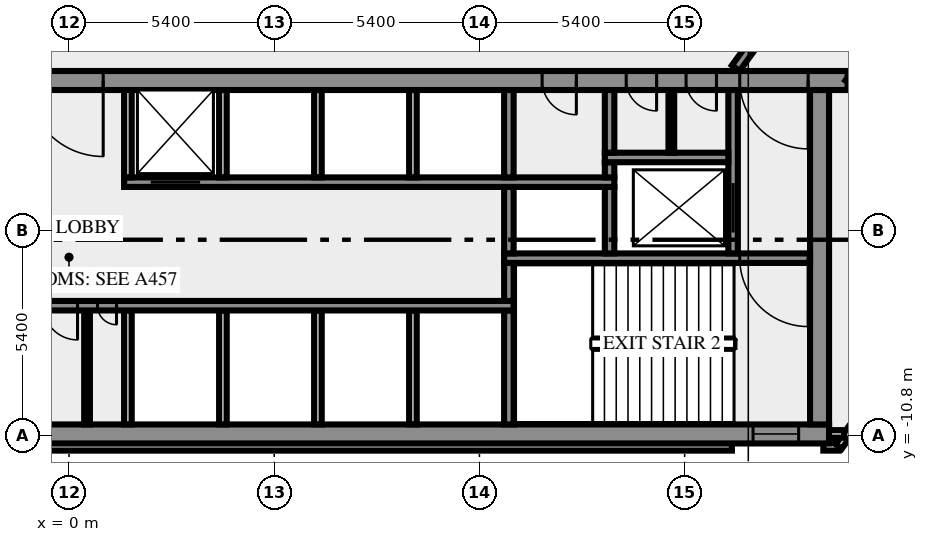
"""IFC4 building model, lengths in metres.
Left out: names, types, materials, properties, quantities, classifications, styles, units other than length and angle.
Written with IfcOpenShell. Run it as: python <this file> out.ifc"""

import sys

from ifc_helpers import new_model, si_unit, direction, frame, frame_2d, origin, place, context, subcontext, project, spatial, rectangle, extrude, element, fill, save


model = new_model("IFC4")
c1 = context("Model", 3, precision=1e-05, world=origin(), true_north=direction((0.0, 1.0)))
c2 = subcontext(c1, "Body", "Model", "MODEL_VIEW")
j1 = project(units=[si_unit("LENGTHUNIT", "METRE"), si_unit("PLANEANGLEUNIT", "RADIAN")], contexts=[c1])
p1 = place(None, origin())
s1 = spatial("IfcSite", under=j1, at=p1, CompositionType="ELEMENT")
p2 = place(p1, origin())
s2 = spatial("IfcBuilding", under=s1, at=p2, CompositionType="ELEMENT")
p3 = place(p2, frame((0.0, 0.0, 55.0)))
s3 = spatial("IfcBuildingStorey", under=s2, at=p3, CompositionType="ELEMENT", Elevation=55.0)
p4 = place(p3, frame((-17.444, -11.088, 0.0), z_axis=(0.0, 0.0, 1.0), x_axis=(1.0, 0.0, 0.0)))
e1 = element("IfcWall", 1, at=p4, inside=s3, PredefinedType="SOLIDWALL", context=c2, shape_type="SweptSolid", body=[
    extrude(rectangle(XDim=34.888, YDim=0.2, at=frame_2d((17.444, 0.0))), origin(), (0.0, 0.0, 1.0), 3.65),
])
p5 = place(p3, frame((19.85, -11.088, 0.0), z_axis=(0.0, 0.0, 1.0), x_axis=(1.0, 0.0, 0.0)))
e2 = element("IfcWall", 2, at=p5, inside=s3, PredefinedType="SOLIDWALL", context=c2, shape_type="SweptSolid", body=[
    extrude(rectangle(XDim=0.406, YDim=0.2, at=frame_2d((0.203, 0.0))), origin(), (0.0, 0.0, 1.0), 3.65),
])
p6 = place(p3, frame((20.253, -11.083, 0.0), z_axis=(0.0, 0.0, 1.0), x_axis=(0.587766567315, 0.809030569476, 0.0)))
e3 = element("IfcWall", 3, at=p6, inside=s3, PredefinedType="SOLIDWALL", context=c2, shape_type="SweptSolid", body=[
    extrude(rectangle(XDim=2.688, YDim=0.2, at=frame_2d((1.344, 0.0))), origin(), (0.0, 0.0, 1.0), 3.65),
])
p7 = place(p3, frame((19.98, -10.75, 0.0), z_axis=(0.0, 0.0, 1.0), x_axis=(1.0, 0.0, 0.0)))
e4 = element("IfcWall", 4, at=p7, inside=s3, PredefinedType="SOLIDWALL", context=c2, shape_type="SweptSolid", body=[
    extrude(rectangle(XDim=0.417, YDim=0.2, at=frame_2d((0.208, 0.0))), origin(), (0.0, 0.0, 1.0), 3.65),
])
p8 = place(p3, frame((-20.0, -10.75, 0.0), z_axis=(0.0, 0.0, 1.0), x_axis=(1.0, 0.0, 0.0)))
e5 = element("IfcWall", 5, at=p8, inside=s3, PredefinedType="SHEAR", context=c2, shape_type="SweptSolid", body=[
    extrude(rectangle(XDim=40.0, YDim=0.5, at=frame_2d((20.0, 0.0))), origin(), (0.0, 0.0, 1.0), 3.65),
])
p9 = place(p8, frame((0.8, 0.0, 1.0)))
e6 = element("IfcOpeningElement", 6, at=p9, cuts=e5, PredefinedType="OPENING", context=c2, shape_type="SweptSolid", body=[
    extrude(rectangle(XDim=1.2, YDim=1.2, at=frame_2d((0.6, 0.6))), frame((0.0, 0.26, 0.0), z_axis=(0.0, -1.0, 0.0), x_axis=(1.0, 0.0, 0.0)), (0.0, 0.0, 1.0), 0.52),
])
p10 = place(p8, frame((38.0, 0.0, 1.0)))
e7 = element("IfcOpeningElement", 7, at=p10, cuts=e5, PredefinedType="OPENING", context=c2, shape_type="SweptSolid", body=[
    extrude(rectangle(XDim=1.2, YDim=1.2, at=frame_2d((0.6, 0.6))), frame((0.0, 0.26, 0.0), z_axis=(0.0, -1.0, 0.0), x_axis=(1.0, 0.0, 0.0)), (0.0, 0.0, 1.0), 0.52),
])
p11 = place(p3, frame((0.475, -10.5, 0.0), z_axis=(0.0, 0.0, 1.0), x_axis=(0.0, 1.0, 0.0)))
e8 = element("IfcWall", 8, at=p11, inside=s3, PredefinedType="PARTITIONING", context=c2, shape_type="SweptSolid", body=[
    extrude(rectangle(XDim=3.0, YDim=0.15, at=frame_2d((1.5, 0.0))), origin(), (0.0, 0.0, 1.0), 3.65),
])
for number, where, z_axis, x_axis in (
    (9, (1.55, -10.5, 0.0), (0.0, 0.0, 1.0), (0.0, 1.0, 0.0)),
    (10, (4.05, -10.5, 0.0), (0.0, 0.0, 1.0), (0.0, 1.0, 0.0)),
    (11, (6.55, -10.5, 0.0), (0.0, 0.0, 1.0), (0.0, 1.0, 0.0)),
    (12, (9.05, -10.5, 0.0), (0.0, 0.0, 1.0), (0.0, 1.0, 0.0)),
):
    element("IfcWall", number, at=place(p3, frame(where, z_axis=z_axis, x_axis=x_axis)), inside=s3, PredefinedType="SOLIDWALL", context=c2, shape_type="SweptSolid", body=[
        extrude(rectangle(XDim=3.0, YDim=0.2, at=frame_2d((1.5, 0.0))), origin(), (0.0, 0.0, 1.0), 3.65),
    ])
p12 = place(p3, frame((11.575, -10.5, 0.0), z_axis=(0.0, 0.0, 1.0), x_axis=(0.0, 1.0, 0.0)))
e13 = element("IfcWall", 13, at=p12, inside=s3, PredefinedType="SHEAR", context=c2, shape_type="SweptSolid", body=[
    extrude(rectangle(XDim=3.0, YDim=0.25, at=frame_2d((1.5, 0.0))), origin(), (0.0, 0.0, 1.0), 3.65),
])
p13 = place(p3, frame((19.75, -10.5, 0.0), z_axis=(0.0, 0.0, 1.0), x_axis=(0.0, 1.0, 0.0)))
e14 = element("IfcWall", 14, at=p13, inside=s3, PredefinedType="SHEAR", context=c2, shape_type="SweptSolid", body=[
    extrude(rectangle(XDim=8.8, YDim=0.5, at=frame_2d((4.4, 0.0))), origin(), (0.0, 0.0, 1.0), 3.65),
])
p14 = place(p3, frame((11.7, -7.375, 0.0), z_axis=(0.0, 0.0, 1.0), x_axis=(-1.0, 0.0, 0.0)))
e15 = element("IfcWall", 15, at=p14, inside=s3, PredefinedType="SHEAR", context=c2, shape_type="SweptSolid", body=[
    extrude(rectangle(XDim=23.4, YDim=0.25, at=frame_2d((11.7, 0.0))), origin(), (0.0, 0.0, 1.0), 3.65),
])
p15 = place(p14, frame((21.45, 0.0, 0.0)))
e16 = element("IfcOpeningElement", 16, at=p15, cuts=e15, PredefinedType="OPENING", context=c2, shape_type="SweptSolid", body=[
    extrude(rectangle(XDim=1.1, YDim=2.1, at=frame_2d((0.55, 1.05))), frame((0.0, 0.135, 0.0), z_axis=(0.0, -1.0, 0.0), x_axis=(1.0, 0.0, 0.0)), (0.0, 0.0, 1.0), 0.27),
])
p16 = place(p14, frame((18.95, 0.0, 0.0)))
e17 = element("IfcOpeningElement", 17, at=p16, cuts=e15, PredefinedType="OPENING", context=c2, shape_type="SweptSolid", body=[
    extrude(rectangle(XDim=1.1, YDim=2.1, at=frame_2d((0.55, 1.05))), frame((0.0, 0.135, 0.0), z_axis=(0.0, -1.0, 0.0), x_axis=(1.0, 0.0, 0.0)), (0.0, 0.0, 1.0), 0.27),
])
p17 = place(p14, frame((16.45, 0.0, 0.0)))
e18 = element("IfcOpeningElement", 18, at=p17, cuts=e15, PredefinedType="OPENING", context=c2, shape_type="SweptSolid", body=[
    extrude(rectangle(XDim=1.1, YDim=2.1, at=frame_2d((0.55, 1.05))), frame((0.0, 0.135, 0.0), z_axis=(0.0, -1.0, 0.0), x_axis=(1.0, 0.0, 0.0)), (0.0, 0.0, 1.0), 0.27),
])
p18 = place(p14, frame((14.5, 0.0, 0.0)))
e19 = element("IfcOpeningElement", 19, at=p18, cuts=e15, PredefinedType="OPENING", context=c2, shape_type="SweptSolid", body=[
    extrude(rectangle(XDim=0.9, YDim=2.1, at=frame_2d((0.45, 1.05))), frame((0.0, 0.135, 0.0), z_axis=(0.0, -1.0, 0.0), x_axis=(1.0, 0.0, 0.0)), (0.0, 0.0, 1.0), 0.27),
])
p19 = place(p14, frame((12.95, 0.0, 0.0)))
e20 = element("IfcOpeningElement", 20, at=p19, cuts=e15, PredefinedType="OPENING", context=c2, shape_type="SweptSolid", body=[
    extrude(rectangle(XDim=0.9, YDim=2.1, at=frame_2d((0.45, 1.05))), frame((0.0, 0.135, 0.0), z_axis=(0.0, -1.0, 0.0), x_axis=(1.0, 0.0, 0.0)), (0.0, 0.0, 1.0), 0.27),
])
p20 = place(p14, frame((11.475, 0.0, 0.0)))
e21 = element("IfcOpeningElement", 21, at=p20, cuts=e15, PredefinedType="OPENING", context=c2, shape_type="SweptSolid", body=[
    extrude(rectangle(XDim=0.9, YDim=2.1, at=frame_2d((0.45, 1.05))), frame((0.0, 0.135, 0.0), z_axis=(0.0, -1.0, 0.0), x_axis=(1.0, 0.0, 0.0)), (0.0, 0.0, 1.0), 0.27),
])
p21 = place(p14, frame((10.45, 0.0, 0.0)))
e22 = element("IfcOpeningElement", 22, at=p21, cuts=e15, PredefinedType="OPENING", context=c2, shape_type="SweptSolid", body=[
    extrude(rectangle(XDim=0.5, YDim=2.1, at=frame_2d((0.25, 1.05))), frame((0.0, 0.135, 0.0), z_axis=(0.0, -1.0, 0.0), x_axis=(1.0, 0.0, 0.0)), (0.0, 0.0, 1.0), 0.27),
])
p22 = place(p3, frame((11.575, -7.25, 0.0), z_axis=(0.0, 0.0, 1.0), x_axis=(0.0, 1.0, 0.0)))
e23 = element("IfcWall", 23, at=p22, inside=s3, PredefinedType="SHEAR", context=c2, shape_type="SweptSolid", body=[
    extrude(rectangle(XDim=1.0, YDim=0.25, at=frame_2d((0.5, 0.0))), origin(), (0.0, 0.0, 1.0), 3.65),
])
p23 = place(p3, frame((19.5, -6.125, 0.0), z_axis=(0.0, 0.0, 1.0), x_axis=(-1.0, 0.0, 0.0)))
e24 = element("IfcWall", 24, at=p23, inside=s3, PredefinedType="SHEAR", context=c2, shape_type="SweptSolid", body=[
    extrude(rectangle(XDim=8.05, YDim=0.25, at=frame_2d((4.025, 0.0))), origin(), (0.0, 0.0, 1.0), 3.65),
])
p24 = place(p23, frame((0.05, 0.0, 0.0)))
e25 = element("IfcOpeningElement", 25, at=p24, cuts=e24, PredefinedType="OPENING", context=c2, shape_type="SweptSolid", body=[
    extrude(rectangle(XDim=1.8, YDim=2.1, at=frame_2d((0.9, 1.05))), frame((0.0, 0.135, 0.0), z_axis=(0.0, -1.0, 0.0), x_axis=(1.0, 0.0, 0.0)), (0.0, 0.0, 1.0), 0.27),
])
for number, where, z_axis, x_axis in (
    (26, (11.575, -6.0, 0.0), (0.0, 0.0, 1.0), (0.0, 1.0, 0.0)),
    (27, (14.225, -6.0, 0.0), (0.0, 0.0, 1.0), (0.0, 1.0, 0.0)),
):
    element("IfcWall", number, at=place(p3, frame(where, z_axis=z_axis, x_axis=x_axis)), inside=s3, PredefinedType="SHEAR", context=c2, shape_type="SweptSolid", body=[
        extrude(rectangle(XDim=1.75, YDim=0.25, at=frame_2d((0.875, 0.0))), origin(), (0.0, 0.0, 1.0), 3.65),
    ])
p25 = place(p3, frame((17.475, -6.0, 0.0), z_axis=(0.0, 0.0, 1.0), x_axis=(0.0, 1.0, 0.0)))
e28 = element("IfcWall", 28, at=p25, inside=s3, PredefinedType="SHEAR", context=c2, shape_type="SweptSolid", body=[
    extrude(rectangle(XDim=4.3, YDim=0.25, at=frame_2d((2.15, 0.0))), origin(), (0.0, 0.0, 1.0), 3.65),
])
p26 = place(p25, frame((0.55, 0.0, 0.0)))
e29 = element("IfcOpeningElement", 29, at=p26, cuts=e28, PredefinedType="OPENING", context=c2, shape_type="SweptSolid", body=[
    extrude(rectangle(XDim=1.3, YDim=2.1, at=frame_2d((0.65, 1.05))), frame((0.0, 0.135, 0.0), z_axis=(0.0, -1.0, 0.0), x_axis=(1.0, 0.0, 0.0)), (0.0, 0.0, 1.0), 0.27),
])
p27 = place(p3, frame((1.45, -4.125, 0.0), z_axis=(0.0, 0.0, 1.0), x_axis=(1.0, 0.0, 0.0)))
e30 = element("IfcWall", 30, at=p27, inside=s3, PredefinedType="SHEAR", context=c2, shape_type="SweptSolid", body=[
    extrude(rectangle(XDim=12.9, YDim=0.25, at=frame_2d((6.45, 0.0))), origin(), (0.0, 0.0, 1.0), 3.65),
])
p28 = place(p27, frame((0.7, 0.0, 0.0)))
e31 = element("IfcOpeningElement", 31, at=p28, cuts=e30, PredefinedType="OPENING", context=c2, shape_type="SweptSolid", body=[
    extrude(rectangle(XDim=1.3, YDim=2.1, at=frame_2d((0.65, 1.05))), frame((0.0, 0.135, 0.0), z_axis=(0.0, -1.0, 0.0), x_axis=(1.0, 0.0, 0.0)), (0.0, 0.0, 1.0), 0.27),
])
for number, where, z_axis, x_axis in (
    (32, (1.55, -4.0, 0.0), (0.0, 0.0, 1.0), (0.0, 1.0, 0.0)),
    (33, (4.05, -4.0, 0.0), (0.0, 0.0, 1.0), (0.0, 1.0, 0.0)),
    (34, (6.55, -4.0, 0.0), (0.0, 0.0, 1.0), (0.0, 1.0, 0.0)),
    (35, (9.05, -4.0, 0.0), (0.0, 0.0, 1.0), (0.0, 1.0, 0.0)),
):
    element("IfcWall", number, at=place(p3, frame(where, z_axis=z_axis, x_axis=x_axis)), inside=s3, PredefinedType="SOLIDWALL", context=c2, shape_type="SweptSolid", body=[
        extrude(rectangle(XDim=2.3, YDim=0.2, at=frame_2d((1.15, 0.0))), origin(), (0.0, 0.0, 1.0), 3.65),
    ])
p29 = place(p3, frame((11.575, -4.0, 0.0), z_axis=(0.0, 0.0, 1.0), x_axis=(0.0, 1.0, 0.0)))
e36 = element("IfcWall", 36, at=p29, inside=s3, PredefinedType="SHEAR", context=c2, shape_type="SweptSolid", body=[
    extrude(rectangle(XDim=2.3, YDim=0.25, at=frame_2d((1.15, 0.0))), origin(), (0.0, 0.0, 1.0), 3.65),
])
p30 = place(p3, frame((14.225, -4.0, 0.0), z_axis=(0.0, 0.0, 1.0), x_axis=(0.0, 1.0, 0.0)))
e37 = element("IfcWall", 37, at=p30, inside=s3, PredefinedType="SHEAR", context=c2, shape_type="SweptSolid", body=[
    extrude(rectangle(XDim=0.4, YDim=0.25, at=frame_2d((0.2, 0.0))), origin(), (0.0, 0.0, 1.0), 3.65),
])
p31 = place(p3, frame((14.1, -3.475, 0.0), z_axis=(0.0, 0.0, 1.0), x_axis=(1.0, 0.0, 0.0)))
e38 = element("IfcWall", 38, at=p31, inside=s3, PredefinedType="SHEAR", context=c2, shape_type="SweptSolid", body=[
    extrude(rectangle(XDim=3.25, YDim=0.25, at=frame_2d((1.625, 0.0))), origin(), (0.0, 0.0, 1.0), 3.65),
])
p32 = place(p3, frame((14.225, -3.35, 0.0), z_axis=(0.0, 0.0, 1.0), x_axis=(0.0, 1.0, 0.0)))
e39 = element("IfcWall", 39, at=p32, inside=s3, PredefinedType="SHEAR", context=c2, shape_type="SweptSolid", body=[
    extrude(rectangle(XDim=1.65, YDim=0.25, at=frame_2d((0.825, 0.0))), origin(), (0.0, 0.0, 1.0), 3.65),
])
p33 = place(p3, frame((15.85, -3.35, 0.0), z_axis=(0.0, 0.0, 1.0), x_axis=(0.0, 1.0, 0.0)))
e40 = element("IfcWall", 40, at=p33, inside=s3, PredefinedType="PARTITIONING", context=c2, shape_type="SweptSolid", body=[
    extrude(rectangle(XDim=1.65, YDim=0.15, at=frame_2d((0.825, 0.0))), origin(), (0.0, 0.0, 1.0), 3.65),
])
p34 = place(p3, frame((20.49, -1.45, 0.0), z_axis=(0.0, 0.0, 1.0), x_axis=(-1.0, 0.0, 0.0)))
e41 = element("IfcWall", 41, at=p34, inside=s3, PredefinedType="SHEAR", context=c2, shape_type="SweptSolid", body=[
    extrude(rectangle(XDim=40.98, YDim=0.5, at=frame_2d((20.49, 0.0))), origin(), (0.0, 0.0, 1.0), 3.65),
])
p35 = place(p34, frame((38.14, 0.0, 0.0)))
e42 = element("IfcOpeningElement", 42, at=p35, cuts=e41, PredefinedType="OPENING", context=c2, shape_type="SweptSolid", body=[
    extrude(rectangle(XDim=1.8, YDim=2.1, at=frame_2d((0.9, 1.05))), frame((0.0, 0.26, 0.0), z_axis=(0.0, -1.0, 0.0), x_axis=(1.0, 0.0, 0.0)), (0.0, 0.0, 1.0), 0.52),
])
p36 = place(p34, frame((35.89, 0.0, 0.0)))
e43 = element("IfcOpeningElement", 43, at=p36, cuts=e41, PredefinedType="OPENING", context=c2, shape_type="SweptSolid", body=[
    extrude(rectangle(XDim=0.9, YDim=2.1, at=frame_2d((0.45, 1.05))), frame((0.0, 0.26, 0.0), z_axis=(0.0, -1.0, 0.0), x_axis=(1.0, 0.0, 0.0)), (0.0, 0.0, 1.0), 0.52),
])
p37 = place(p34, frame((32.94, 0.0, 0.0)))
e44 = element("IfcOpeningElement", 44, at=p37, cuts=e41, PredefinedType="OPENING", context=c2, shape_type="SweptSolid", body=[
    extrude(rectangle(XDim=0.9, YDim=2.1, at=frame_2d((0.45, 1.05))), frame((0.0, 0.26, 0.0), z_axis=(0.0, -1.0, 0.0), x_axis=(1.0, 0.0, 0.0)), (0.0, 0.0, 1.0), 0.52),
])
p38 = place(p34, frame((19.59, 0.0, 0.0)))
e45 = element("IfcOpeningElement", 45, at=p38, cuts=e41, PredefinedType="OPENING", context=c2, shape_type="SweptSolid", body=[
    extrude(rectangle(XDim=2.0, YDim=2.1, at=frame_2d((1.0, 1.05))), frame((0.0, 0.26, 0.0), z_axis=(0.0, -1.0, 0.0), x_axis=(1.0, 0.0, 0.0)), (0.0, 0.0, 1.0), 0.52),
])
p39 = place(p34, frame((7.14, 0.0, 0.0)))
e46 = element("IfcOpeningElement", 46, at=p39, cuts=e41, PredefinedType="OPENING", context=c2, shape_type="SweptSolid", body=[
    extrude(rectangle(XDim=0.9, YDim=2.1, at=frame_2d((0.45, 1.05))), frame((0.0, 0.26, 0.0), z_axis=(0.0, -1.0, 0.0), x_axis=(1.0, 0.0, 0.0)), (0.0, 0.0, 1.0), 0.52),
])
p40 = place(p34, frame((5.028, 0.0, 0.0)))
e47 = element("IfcOpeningElement", 47, at=p40, cuts=e41, PredefinedType="OPENING", context=c2, shape_type="SweptSolid", body=[
    extrude(rectangle(XDim=0.8, YDim=2.1, at=frame_2d((0.4, 1.05))), frame((0.0, 0.26, 0.0), z_axis=(0.0, -1.0, 0.0), x_axis=(1.0, 0.0, 0.0)), (0.0, 0.0, 1.0), 0.52),
])
p41 = place(p34, frame((3.452, 0.0, 0.0)))
e48 = element("IfcOpeningElement", 48, at=p41, cuts=e41, PredefinedType="OPENING", context=c2, shape_type="SweptSolid", body=[
    extrude(rectangle(XDim=0.8, YDim=2.1, at=frame_2d((0.4, 1.05))), frame((0.0, 0.26, 0.0), z_axis=(0.0, -1.0, 0.0), x_axis=(1.0, 0.0, 0.0)), (0.0, 0.0, 1.0), 0.52),
])
p42 = place(p34, frame((1.04, 0.0, 0.0)))
e49 = element("IfcOpeningElement", 49, at=p42, cuts=e41, PredefinedType="OPENING", context=c2, shape_type="SweptSolid", body=[
    extrude(rectangle(XDim=1.8, YDim=2.1, at=frame_2d((0.9, 1.05))), frame((0.0, 0.26, 0.0), z_axis=(0.0, -1.0, 0.0), x_axis=(1.0, 0.0, 0.0)), (0.0, 0.0, 1.0), 0.52),
])
p43 = place(p3, frame((17.545, -1.125, 0.0), z_axis=(0.0, 0.0, 1.0), x_axis=(0.587786323093, 0.809016216391, 0.0)))
e50 = element("IfcWall", 50, at=p43, inside=s3, PredefinedType="SOLIDWALL", context=c2, shape_type="SweptSolid", body=[
    extrude(rectangle(XDim=33.493, YDim=0.25, at=frame_2d((16.747, 0.0))), origin(), (0.0, 0.0, 1.0), 3.65),
])
p44 = place(p43, frame((31.403, 0.0, 0.0)))
e51 = element("IfcOpeningElement", 51, at=p44, cuts=e50, PredefinedType="OPENING", context=c2, shape_type="SweptSolid", body=[
    extrude(rectangle(XDim=1.8, YDim=2.1, at=frame_2d((0.9, 1.05))), frame((0.0, 0.135, 0.0), z_axis=(0.0, -1.0, 0.0), x_axis=(1.0, 0.0, 0.0)), (0.0, 0.0, 1.0), 0.27),
])
p45 = place(p43, frame((3.392, 0.0, 0.0)))
e52 = element("IfcOpeningElement", 52, at=p45, cuts=e50, PredefinedType="OPENING", context=c2, shape_type="SweptSolid", body=[
    extrude(rectangle(XDim=1.8, YDim=2.1, at=frame_2d((0.9, 1.05))), frame((0.0, 0.135, 0.0), z_axis=(0.0, -1.0, 0.0), x_axis=(1.0, 0.0, 0.0)), (0.0, 0.0, 1.0), 0.27),
])
p46 = place(p3, frame((43.467, 30.045, 0.0), z_axis=(0.0, 0.0, 1.0), x_axis=(-0.587784726077, -0.809017376692, 0.0)))
e53 = element("IfcWall", 53, at=p46, inside=s3, PredefinedType="SOLIDWALL", context=c2, shape_type="SweptSolid", body=[
    extrude(rectangle(XDim=39.02, YDim=0.25, at=frame_2d((19.51, 0.0))), origin(), (0.0, 0.0, 1.0), 3.65),
])
p47 = place(p46, frame((11.404, 0.0, 0.0)))
e54 = element("IfcOpeningElement", 54, at=p47, cuts=e53, PredefinedType="OPENING", context=c2, shape_type="SweptSolid", body=[
    extrude(rectangle(XDim=0.9, YDim=2.1, at=frame_2d((0.45, 1.05))), frame((0.0, 0.135, 0.0), z_axis=(0.0, -1.0, 0.0), x_axis=(1.0, 0.0, 0.0)), (0.0, 0.0, 1.0), 0.27),
])
p48 = place(p46, frame((13.004, 0.0, 0.0)))
e55 = element("IfcOpeningElement", 55, at=p48, cuts=e53, PredefinedType="OPENING", context=c2, shape_type="SweptSolid", body=[
    extrude(rectangle(XDim=1.0, YDim=2.1, at=frame_2d((0.5, 1.05))), frame((0.0, 0.135, 0.0), z_axis=(0.0, -1.0, 0.0), x_axis=(1.0, 0.0, 0.0)), (0.0, 0.0, 1.0), 0.27),
])
p49 = place(p46, frame((37.287, 0.0, 0.0)))
e56 = element("IfcOpeningElement", 56, at=p49, cuts=e53, PredefinedType="OPENING", context=c2, shape_type="SweptSolid", body=[
    extrude(rectangle(XDim=1.2, YDim=2.1, at=frame_2d((0.6, 1.05))), frame((0.0, 0.135, 0.0), z_axis=(0.0, -1.0, 0.0), x_axis=(1.0, 0.0, 0.0)), (0.0, 0.0, 1.0), 0.27),
])
p50 = place(p46, frame((0.224, 0.0, 0.0)))
e57 = element("IfcOpeningElement", 57, at=p50, cuts=e53, PredefinedType="OPENING", context=c2, shape_type="SweptSolid", body=[
    extrude(rectangle(XDim=0.9, YDim=2.1, at=frame_2d((0.45, 1.05))), frame((0.0, 0.135, 0.0), z_axis=(0.0, -1.0, 0.0), x_axis=(1.0, 0.0, 0.0)), (0.0, 0.0, 1.0), 0.27),
])
p51 = place(p10, origin())
e58 = element("IfcWindow", 58, at=p51, inside=s3, PartitioningType="SINGLE_PANEL", PredefinedType="WINDOW", context=c2, shape_type="SweptSolid", body=[
    extrude(rectangle(XDim=1.2, YDim=1.2, at=frame_2d((0.6, 0.6))), frame((0.0, 0.03, 0.0), z_axis=(0.0, -1.0, 0.0), x_axis=(1.0, 0.0, 0.0)), (0.0, 0.0, 1.0), 0.06),
])
fill(e7, e58)
p52 = place(p20, origin())
e59 = element("IfcDoor", 59, at=p52, inside=s3, OperationType="SINGLE_SWING_RIGHT", PredefinedType="DOOR", context=c2, shape_type="SweptSolid", body=[
    extrude(rectangle(XDim=0.9, YDim=2.1, at=frame_2d((0.45, 1.05))), frame((0.0, 0.025, 0.0), z_axis=(0.0, -1.0, 0.0), x_axis=(1.0, 0.0, 0.0)), (0.0, 0.0, 1.0), 0.05),
])
fill(e21, e59)
p53 = place(p21, origin())
e60 = element("IfcDoor", 60, at=p53, inside=s3, OperationType="SINGLE_SWING_LEFT", PredefinedType="DOOR", context=c2, shape_type="SweptSolid", body=[
    extrude(rectangle(XDim=0.5, YDim=2.1, at=frame_2d((0.25, 1.05))), frame((0.0, 0.025, 0.0), z_axis=(0.0, -1.0, 0.0), x_axis=(1.0, 0.0, 0.0)), (0.0, 0.0, 1.0), 0.05),
])
fill(e22, e60)
p54 = place(p24, origin())
e61 = element("IfcDoor", 61, at=p54, inside=s3, OperationType="DOUBLE_DOOR_SINGLE_SWING", PredefinedType="DOOR", context=c2, shape_type="SweptSolid", body=[
    extrude(rectangle(XDim=1.8, YDim=2.1, at=frame_2d((0.9, 1.05))), frame((0.0, 0.025, 0.0), z_axis=(0.0, -1.0, 0.0), x_axis=(1.0, 0.0, 0.0)), (0.0, 0.0, 1.0), 0.05),
])
fill(e25, e61)
p55 = place(p26, origin())
e62 = element("IfcDoor", 62, at=p55, inside=s3, OperationType="DOUBLE_DOOR_SLIDING", PredefinedType="DOOR", context=c2, shape_type="SweptSolid", body=[
    extrude(rectangle(XDim=1.3, YDim=2.1, at=frame_2d((0.65, 1.05))), frame((0.0, 0.025, 0.0), z_axis=(0.0, -1.0, 0.0), x_axis=(1.0, 0.0, 0.0)), (0.0, 0.0, 1.0), 0.05),
])
fill(e29, e62)
p56 = place(p28, origin())
e63 = element("IfcDoor", 63, at=p56, inside=s3, OperationType="DOUBLE_DOOR_SLIDING", PredefinedType="DOOR", context=c2, shape_type="SweptSolid", body=[
    extrude(rectangle(XDim=1.3, YDim=2.1, at=frame_2d((0.65, 1.05))), frame((0.0, 0.025, 0.0), z_axis=(0.0, -1.0, 0.0), x_axis=(1.0, 0.0, 0.0)), (0.0, 0.0, 1.0), 0.05),
])
fill(e31, e63)
p57 = place(p38, origin())
e64 = element("IfcDoor", 64, at=p57, inside=s3, OperationType="DOUBLE_DOOR_SINGLE_SWING", PredefinedType="DOOR", context=c2, shape_type="SweptSolid", body=[
    extrude(rectangle(XDim=2.0, YDim=2.1, at=frame_2d((1.0, 1.05))), frame((0.0, 0.025, 0.0), z_axis=(0.0, -1.0, 0.0), x_axis=(1.0, 0.0, 0.0)), (0.0, 0.0, 1.0), 0.05),
])
fill(e45, e64)
p58 = place(p39, origin())
e65 = element("IfcDoor", 65, at=p58, inside=s3, OperationType="SINGLE_SWING_LEFT", PredefinedType="DOOR", context=c2, shape_type="SweptSolid", body=[
    extrude(rectangle(XDim=0.9, YDim=2.1, at=frame_2d((0.45, 1.05))), frame((0.0, 0.025, 0.0), z_axis=(0.0, -1.0, 0.0), x_axis=(1.0, 0.0, 0.0)), (0.0, 0.0, 1.0), 0.05),
])
fill(e46, e65)
p59 = place(p40, origin())
e66 = element("IfcDoor", 66, at=p59, inside=s3, OperationType="SINGLE_SWING_LEFT", PredefinedType="DOOR", context=c2, shape_type="SweptSolid", body=[
    extrude(rectangle(XDim=0.8, YDim=2.1, at=frame_2d((0.4, 1.05))), frame((0.0, 0.025, 0.0), z_axis=(0.0, -1.0, 0.0), x_axis=(1.0, 0.0, 0.0)), (0.0, 0.0, 1.0), 0.05),
])
fill(e47, e66)
p60 = place(p41, origin())
e67 = element("IfcDoor", 67, at=p60, inside=s3, OperationType="SINGLE_SWING_LEFT", PredefinedType="DOOR", context=c2, shape_type="SweptSolid", body=[
    extrude(rectangle(XDim=0.8, YDim=2.1, at=frame_2d((0.4, 1.05))), frame((0.0, 0.025, 0.0), z_axis=(0.0, -1.0, 0.0), x_axis=(1.0, 0.0, 0.0)), (0.0, 0.0, 1.0), 0.05),
])
fill(e48, e67)
p61 = place(p42, origin())
e68 = element("IfcDoor", 68, at=p61, inside=s3, OperationType="DOUBLE_DOOR_SINGLE_SWING", PredefinedType="DOOR", context=c2, shape_type="SweptSolid", body=[
    extrude(rectangle(XDim=1.8, YDim=2.1, at=frame_2d((0.9, 1.05))), frame((0.0, 0.025, 0.0), z_axis=(0.0, -1.0, 0.0), x_axis=(1.0, 0.0, 0.0)), (0.0, 0.0, 1.0), 0.05),
])
fill(e49, e68)
save(model, sys.argv[1])
